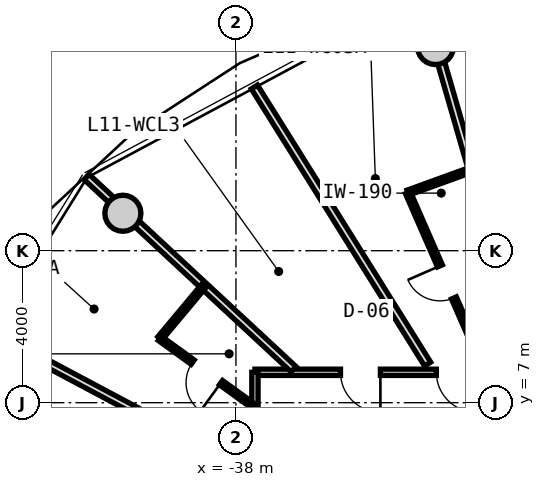
"""IFC4 building model, lengths in metres.
Left out: names, types, materials, properties, quantities, classifications, styles, units other than length and angle.
Written with IfcOpenShell. Run it as: python <this file> out.ifc"""

import sys

from ifc_helpers import new_model, si_unit, direction, frame, frame_2d, origin, origin_2d, place, context, subcontext, project, spatial, rectangle, circle, extrude, source, transform, mapped, element, fill, save


model = new_model("IFC4")
c1 = context("Model", 3, precision=1e-05, world=origin(), true_north=direction((0.0, 1.0)))
c2 = subcontext(c1, "Body", "Model", "MODEL_VIEW")
j1 = project(units=[si_unit("LENGTHUNIT", "METRE"), si_unit("PLANEANGLEUNIT", "RADIAN")], contexts=[c1])
p1 = place(None, origin())
s1 = spatial("IfcSite", under=j1, at=p1, CompositionType="ELEMENT")
p2 = place(p1, origin())
s2 = spatial("IfcBuilding", under=s1, at=p2, CompositionType="ELEMENT")
p3 = place(p2, frame((0.0, 0.0, 39.9)))
s3 = spatial("IfcBuildingStorey", under=s2, at=p3, CompositionType="ELEMENT", Elevation=39.9)
m1 = source(origin(), c2, "Body", "SweptSolid", [
    extrude(circle(Radius=0.475, at=origin_2d()), origin(), (0.0, 0.0, 1.0), 3.05),
])
for number, where, z_axis, x_axis in (
    (1, (-32.749, 16.373, 0.0), (0.0, 0.0, 1.0), (1.0, 0.0, 0.0)),
    (2, (-40.975, 11.985, 0.0), (0.0, 0.0, 1.0), (1.0, 0.0, 0.0)),
):
    element("IfcColumn", number, at=place(p3, frame(where, z_axis=z_axis, x_axis=x_axis)), inside=s3, PredefinedType="COLUMN", context=c2, shape_type="MappedRepresentation", body=[
        mapped(m1, transform((0.0, 0.0, 0.0), x_axis=(1.0, 0.0, 0.0), y_axis=(0.0, 1.0, 0.0), z_axis=(0.0, 0.0, 1.0), scale=1.0)),
    ])
m2 = source(origin(), c2, "Body", "SweptSolid", [
    extrude(rectangle(XDim=19.0, YDim=0.165, at=frame_2d((9.5, 0.0))), origin(), (0.0, 0.0, 1.0), 2.775),
])
p4 = place(p3, frame((-37.5, 7.8, 0.0), z_axis=(0.0, 0.0, 1.0), x_axis=(1.0, 0.0, 0.0)))
e3 = element("IfcWall", 3, at=p4, inside=s3, PredefinedType="PARTITIONING", context=c2, shape_type="MappedRepresentation", body=[
    mapped(m2, transform((0.0, 0.0, 0.0), x_axis=(1.0, 0.0, 0.0), y_axis=(0.0, 1.0, 0.0), z_axis=(0.0, 0.0, 1.0), scale=1.0)),
])
p5 = place(p4, frame((4.773, 0.0, 0.0)))
e4 = element("IfcOpeningElement", 4, at=p5, cuts=e3, PredefinedType="OPENING", context=c2, shape_type="SweptSolid", body=[
    extrude(rectangle(XDim=1.05, YDim=2.15, at=frame_2d((0.525, 1.075))), frame((0.0, 0.093, 0.0), z_axis=(0.0, -1.0, 0.0), x_axis=(1.0, 0.0, 0.0)), (0.0, 0.0, 1.0), 0.185),
])
p6 = place(p4, frame((2.251, 0.0, 0.0)))
e5 = element("IfcOpeningElement", 5, at=p6, cuts=e3, PredefinedType="OPENING", context=c2, shape_type="SweptSolid", body=[
    extrude(rectangle(XDim=1.05, YDim=2.15, at=frame_2d((0.525, 1.075))), frame((0.0, 0.093, 0.0), z_axis=(0.0, -1.0, 0.0), x_axis=(1.0, 0.0, 0.0)), (0.0, 0.0, 1.0), 0.185),
])
p7 = place(p4, frame((14.653, 0.0, 0.0)))
e6 = element("IfcOpeningElement", 6, at=p7, cuts=e3, PredefinedType="OPENING", context=c2, shape_type="SweptSolid", body=[
    extrude(rectangle(XDim=1.05, YDim=2.15, at=frame_2d((0.525, 1.075))), frame((0.0, 0.093, 0.0), z_axis=(0.0, -1.0, 0.0), x_axis=(1.0, 0.0, 0.0)), (0.0, 0.0, 1.0), 0.185),
])
p8 = place(p4, frame((12.5, 0.0, 0.0)))
e7 = element("IfcOpeningElement", 7, at=p8, cuts=e3, PredefinedType="OPENING", context=c2, shape_type="SweptSolid", body=[
    extrude(rectangle(XDim=1.05, YDim=2.15, at=frame_2d((0.525, 1.075))), frame((0.0, 0.093, 0.0), z_axis=(0.0, -1.0, 0.0), x_axis=(1.0, 0.0, 0.0)), (0.0, 0.0, 1.0), 0.185),
])
p9 = place(p4, frame((9.352, 0.0, 0.0)))
e8 = element("IfcOpeningElement", 8, at=p9, cuts=e3, PredefinedType="OPENING", context=c2, shape_type="SweptSolid", body=[
    extrude(rectangle(XDim=1.05, YDim=2.15, at=frame_2d((0.525, 1.075))), frame((0.0, 0.093, 0.0), z_axis=(0.0, -1.0, 0.0), x_axis=(1.0, 0.0, 0.0)), (0.0, 0.0, 1.0), 0.185),
])
p10 = place(p4, frame((7.806, 0.0, 0.0)))
e9 = element("IfcOpeningElement", 9, at=p10, cuts=e3, PredefinedType="OPENING", context=c2, shape_type="SweptSolid", body=[
    extrude(rectangle(XDim=1.05, YDim=2.15, at=frame_2d((0.525, 1.075))), frame((0.0, 0.093, 0.0), z_axis=(0.0, -1.0, 0.0), x_axis=(1.0, 0.0, 0.0)), (0.0, 0.0, 1.0), 0.185),
])
m3 = source(origin(), c2, "Body", "SweptSolid", [
    extrude(rectangle(XDim=15.6, YDim=0.165, at=frame_2d((7.8, 0.0))), origin(), (0.0, 0.0, 1.0), 2.775),
])
p11 = place(p3, frame((-37.5, -7.8, 0.0), z_axis=(0.0, 0.0, 1.0), x_axis=(0.0, 1.0, 0.0)))
e10 = element("IfcWall", 10, at=p11, inside=s3, PredefinedType="PARTITIONING", context=c2, shape_type="MappedRepresentation", body=[
    mapped(m3, transform((0.0, 0.0, 0.0), x_axis=(1.0, 0.0, 0.0), y_axis=(0.0, 1.0, 0.0), z_axis=(0.0, 0.0, 1.0), scale=1.0)),
])
p12 = place(p11, frame((13.293, 0.0, 0.0)))
e11 = element("IfcOpeningElement", 11, at=p12, cuts=e10, PredefinedType="OPENING", context=c2, shape_type="SweptSolid", body=[
    extrude(rectangle(XDim=1.05, YDim=2.15, at=frame_2d((0.525, 1.075))), frame((0.0, 0.093, 0.0), z_axis=(0.0, -1.0, 0.0), x_axis=(1.0, 0.0, 0.0)), (0.0, 0.0, 1.0), 0.185),
])
p13 = place(p11, frame((11.018, 0.0, 0.0)))
e12 = element("IfcOpeningElement", 12, at=p13, cuts=e10, PredefinedType="OPENING", context=c2, shape_type="SweptSolid", body=[
    extrude(rectangle(XDim=1.05, YDim=2.15, at=frame_2d((0.525, 1.075))), frame((0.0, 0.093, 0.0), z_axis=(0.0, -1.0, 0.0), x_axis=(1.0, 0.0, 0.0)), (0.0, 0.0, 1.0), 0.185),
])
p14 = place(p11, frame((7.812, 0.0, 0.0)))
e13 = element("IfcOpeningElement", 13, at=p14, cuts=e10, PredefinedType="OPENING", context=c2, shape_type="SweptSolid", body=[
    extrude(rectangle(XDim=1.05, YDim=2.15, at=frame_2d((0.525, 1.075))), frame((0.0, 0.093, 0.0), z_axis=(0.0, -1.0, 0.0), x_axis=(1.0, 0.0, 0.0)), (0.0, 0.0, 1.0), 0.185),
])
p15 = place(p11, frame((6.035, 0.0, 0.0)))
e14 = element("IfcOpeningElement", 14, at=p15, cuts=e10, PredefinedType="OPENING", context=c2, shape_type="SweptSolid", body=[
    extrude(rectangle(XDim=1.05, YDim=2.15, at=frame_2d((0.525, 1.075))), frame((0.0, 0.093, 0.0), z_axis=(0.0, -1.0, 0.0), x_axis=(1.0, 0.0, 0.0)), (0.0, 0.0, 1.0), 0.185),
])
p16 = place(p11, frame((3.489, 0.0, 0.0)))
e15 = element("IfcOpeningElement", 15, at=p16, cuts=e10, PredefinedType="OPENING", context=c2, shape_type="SweptSolid", body=[
    extrude(rectangle(XDim=1.05, YDim=2.15, at=frame_2d((0.525, 1.075))), frame((0.0, 0.093, 0.0), z_axis=(0.0, -1.0, 0.0), x_axis=(1.0, 0.0, 0.0)), (0.0, 0.0, 1.0), 0.185),
])
p17 = place(p11, frame((0.882, 0.0, 0.0)))
e16 = element("IfcOpeningElement", 16, at=p17, cuts=e10, PredefinedType="OPENING", context=c2, shape_type="SweptSolid", body=[
    extrude(rectangle(XDim=1.05, YDim=2.15, at=frame_2d((0.525, 1.075))), frame((0.0, 0.093, 0.0), z_axis=(0.0, -1.0, 0.0), x_axis=(1.0, 0.0, 0.0)), (0.0, 0.0, 1.0), 0.185),
])
m4 = source(origin(), c2, "Body", "SweptSolid", [
    extrude(rectangle(XDim=10.196, YDim=0.19, at=frame_2d((5.098, 0.0))), origin(), (0.0, 0.0, 1.0), 2.225),
])
p18 = place(p3, frame((-30.273, 7.88, 0.0), z_axis=(0.0, 0.0, 1.0), x_axis=(-0.277136420347, 0.960830580549, 0.0)))
e17 = element("IfcWall", 17, at=p18, inside=s3, PredefinedType="PARTITIONING", context=c2, shape_type="MappedRepresentation", body=[
    mapped(m4, transform((0.0, 0.0, 0.0), x_axis=(1.0, 0.0, 0.0), y_axis=(0.0, 1.0, 0.0), z_axis=(0.0, 0.0, 1.0), scale=1.0)),
])
m5 = source(origin(), c2, "Body", "SweptSolid", [
    extrude(rectangle(XDim=7.435, YDim=0.19, at=frame_2d((3.717, 0.0))), origin(), (0.0, 0.0, 1.0), 2.225),
])
p19 = place(p3, frame((-36.483, 7.88, 0.0), z_axis=(0.0, 0.0, 1.0), x_axis=(-0.732651956848, 0.680603489652, 0.0)))
e18 = element("IfcWall", 18, at=p19, inside=s3, PredefinedType="PARTITIONING", context=c2, shape_type="MappedRepresentation", body=[
    mapped(m5, transform((0.0, 0.0, 0.0), x_axis=(1.0, 0.0, 0.0), y_axis=(0.0, 1.0, 0.0), z_axis=(0.0, 0.0, 1.0), scale=1.0)),
])
m6 = source(origin(), c2, "Body", "SweptSolid", [
    extrude(rectangle(XDim=8.598, YDim=0.19, at=frame_2d((4.299, 0.0))), origin(), (0.0, 0.0, 1.0), 2.775),
])
p20 = place(p3, frame((-32.957, 8.017, 0.0), z_axis=(0.0, 0.0, 1.0), x_axis=(-0.530039776395, 0.847972779893, 0.0)))
e19 = element("IfcWall", 19, at=p20, inside=s3, PredefinedType="PARTITIONING", context=c2, shape_type="MappedRepresentation", body=[
    mapped(m6, transform((0.0, 0.0, 0.0), x_axis=(1.0, 0.0, 0.0), y_axis=(0.0, 1.0, 0.0), z_axis=(0.0, 0.0, 1.0), scale=1.0)),
])
m7 = source(origin(), c2, "Body", "SweptSolid", [
    extrude(rectangle(XDim=5.126, YDim=0.14, at=frame_2d((2.563, 0.0))), origin(), (0.0, 0.0, 1.0), 2.775),
])
p21 = place(p3, frame((-31.422, 7.83, 0.0), z_axis=(0.0, 0.0, 1.0), x_axis=(-0.400473994842, 0.916308124735, 0.0)))
e20 = element("IfcWall", 20, at=p21, inside=s3, PredefinedType="PARTITIONING", context=c2, shape_type="MappedRepresentation", body=[
    mapped(m7, transform((0.0, 0.0, 0.0), x_axis=(1.0, 0.0, 0.0), y_axis=(0.0, 1.0, 0.0), z_axis=(0.0, 0.0, 1.0), scale=1.0)),
])
p22 = place(p21, frame((2.103, 0.0, 0.0)))
e21 = element("IfcOpeningElement", 21, at=p22, cuts=e20, PredefinedType="OPENING", context=c2, shape_type="SweptSolid", body=[
    extrude(rectangle(XDim=0.92, YDim=2.1, at=frame_2d((0.46, 1.05))), frame((0.0, 0.08, 0.0), z_axis=(0.0, -1.0, 0.0), x_axis=(1.0, 0.0, 0.0)), (0.0, 0.0, 1.0), 0.16),
])
m8 = source(origin(), c2, "Body", "SweptSolid", [
    extrude(rectangle(XDim=1.811, YDim=0.14, at=frame_2d((0.906, 0.0))), origin(), (0.0, 0.0, 1.0), 2.775),
])
p23 = place(p3, frame((-33.475, 12.527, 0.0), z_axis=(0.0, 0.0, 1.0), x_axis=(0.940009682452, 0.341147764021, 0.0)))
e22 = element("IfcWall", 22, at=p23, inside=s3, PredefinedType="PARTITIONING", context=c2, shape_type="MappedRepresentation", body=[
    mapped(m8, transform((0.0, 0.0, 0.0), x_axis=(1.0, 0.0, 0.0), y_axis=(0.0, 1.0, 0.0), z_axis=(0.0, 0.0, 1.0), scale=1.0)),
])
m9 = source(origin(), c2, "Body", "SweptSolid", [
    extrude(rectangle(XDim=7.677, YDim=0.19, at=frame_2d((3.838, 0.0))), origin(), (0.0, 0.0, 1.0), 2.775),
])
p24 = place(p3, frame((-37.703, 5.231, 0.0), z_axis=(0.0, 0.0, 1.0), x_axis=(-0.882725057546, 0.469889851753, 0.0)))
e23 = element("IfcWall", 23, at=p24, inside=s3, PredefinedType="PARTITIONING", context=c2, shape_type="MappedRepresentation", body=[
    mapped(m9, transform((0.0, 0.0, 0.0), x_axis=(1.0, 0.0, 0.0), y_axis=(0.0, 1.0, 0.0), z_axis=(0.0, 0.0, 1.0), scale=1.0)),
])
m10 = source(origin(), c2, "Body", "SweptSolid", [
    extrude(rectangle(XDim=3.051, YDim=0.14, at=frame_2d((1.525, 0.0))), origin(), (0.0, 0.0, 1.0), 2.775),
])
p25 = place(p3, frame((-37.53, 6.903, 0.0), z_axis=(0.0, 0.0, 1.0), x_axis=(-0.809849031404, 0.586638343729, 0.0)))
e24 = element("IfcWall", 24, at=p25, inside=s3, PredefinedType="PARTITIONING", context=c2, shape_type="MappedRepresentation", body=[
    mapped(m10, transform((0.0, 0.0, 0.0), x_axis=(1.0, 0.0, 0.0), y_axis=(0.0, 1.0, 0.0), z_axis=(0.0, 0.0, 1.0), scale=1.0)),
])
p26 = place(p25, frame((1.065, 0.0, 0.0)))
e25 = element("IfcOpeningElement", 25, at=p26, cuts=e24, PredefinedType="OPENING", context=c2, shape_type="SweptSolid", body=[
    extrude(rectangle(XDim=0.92, YDim=2.1, at=frame_2d((0.46, 1.05))), frame((0.0, 0.08, 0.0), z_axis=(0.0, -1.0, 0.0), x_axis=(1.0, 0.0, 0.0)), (0.0, 0.0, 1.0), 0.16),
])
m11 = source(origin(), c2, "Body", "SweptSolid", [
    extrude(rectangle(XDim=1.84, YDim=0.14, at=frame_2d((0.92, 0.0))), origin(), (0.0, 0.0, 1.0), 2.415),
])
p27 = place(p3, frame((-40.0, 8.692, 0.0), z_axis=(0.0, 0.0, 1.0), x_axis=(0.641410397049, 0.767197955262, 0.0)))
e26 = element("IfcWall", 26, at=p27, inside=s3, PredefinedType="PARTITIONING", context=c2, shape_type="MappedRepresentation", body=[
    mapped(m11, transform((0.0, 0.0, 0.0), x_axis=(1.0, 0.0, 0.0), y_axis=(0.0, 1.0, 0.0), z_axis=(0.0, 0.0, 1.0), scale=1.0)),
])
m12 = source(origin(), c2, "Body", "SweptSolid", [
    extrude(rectangle(XDim=1.05, YDim=2.15, at=frame_2d((0.525, 1.075))), frame((0.0, 0.025, 0.0), z_axis=(0.0, -1.0, 0.0), x_axis=(1.0, 0.0, 0.0)), (0.0, 0.0, 1.0), 0.05),
])
p28 = place(p5, frame((1.05, 0.0, 0.0), z_axis=(0.0, 0.0, 1.0), x_axis=(-1.0, 0.0, 0.0)))
e27 = element("IfcDoor", 27, at=p28, inside=s3, OperationType="SINGLE_SWING_LEFT", PredefinedType="DOOR", context=c2, shape_type="MappedRepresentation", body=[
    mapped(m12, transform((0.0, 0.0, 0.0), x_axis=(1.0, 0.0, 0.0), y_axis=(0.0, 1.0, 0.0), z_axis=(0.0, 0.0, 1.0), scale=1.0)),
])
fill(e4, e27)
m13 = source(origin(), c2, "Body", "SweptSolid", [
    extrude(rectangle(XDim=0.92, YDim=2.1, at=frame_2d((0.46, 1.05))), frame((0.0, 0.025, 0.0), z_axis=(0.0, -1.0, 0.0), x_axis=(1.0, 0.0, 0.0)), (0.0, 0.0, 1.0), 0.05),
])
p29 = place(p22, origin())
e28 = element("IfcDoor", 28, at=p29, inside=s3, OperationType="SINGLE_SWING_RIGHT", PredefinedType="DOOR", context=c2, shape_type="MappedRepresentation", body=[
    mapped(m13, transform((0.0, 0.0, 0.0), x_axis=(1.0, 0.0, 0.0), y_axis=(0.0, 1.0, 0.0), z_axis=(0.0, 0.0, 1.0), scale=1.0)),
])
fill(e21, e28)
p30 = place(p6, frame((1.05, 0.0, 0.0), z_axis=(0.0, 0.0, 1.0), x_axis=(-1.0, 0.0, 0.0)))
e29 = element("IfcDoor", 29, at=p30, inside=s3, OperationType="SINGLE_SWING_LEFT", PredefinedType="DOOR", context=c2, shape_type="MappedRepresentation", body=[
    mapped(m12, transform((0.0, 0.0, 0.0), x_axis=(1.0, 0.0, 0.0), y_axis=(0.0, 1.0, 0.0), z_axis=(0.0, 0.0, 1.0), scale=1.0)),
])
fill(e5, e29)
p31 = place(p26, origin())
e30 = element("IfcDoor", 30, at=p31, inside=s3, OperationType="SINGLE_SWING_LEFT", PredefinedType="DOOR", context=c2, shape_type="MappedRepresentation", body=[
    mapped(m13, transform((0.0, 0.0, 0.0), x_axis=(1.0, 0.0, 0.0), y_axis=(0.0, 1.0, 0.0), z_axis=(0.0, 0.0, 1.0), scale=1.0)),
])
fill(e25, e30)
save(model, sys.argv[1])
